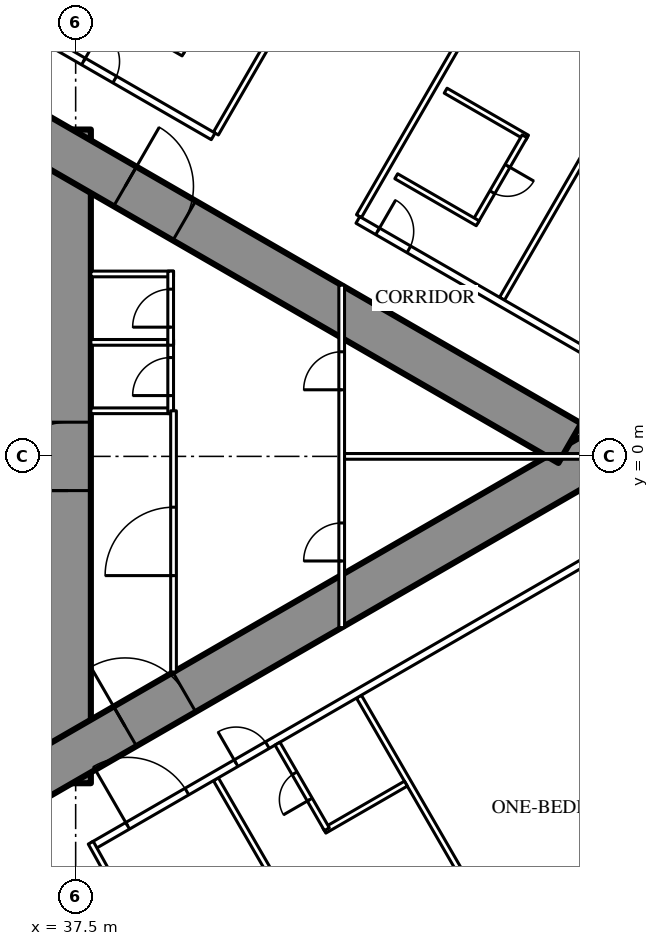
"""IFC4 building model, lengths in metres.
Left out: names, types, materials, properties, quantities, classifications, styles, units other than length and angle.
Written with IfcOpenShell. Run it as: python <this file> out.ifc"""

import sys

from ifc_helpers import new_model, si_unit, direction, frame, frame_2d, origin, place, context, subcontext, project, spatial, rectangle, extrude, element, fill, save


model = new_model("IFC4")
c1 = context("Model", 3, precision=1e-05, world=origin(), true_north=direction((0.0, 1.0)))
c2 = subcontext(c1, "Body", "Model", "MODEL_VIEW")
j1 = project(units=[si_unit("LENGTHUNIT", "METRE"), si_unit("PLANEANGLEUNIT", "RADIAN")], contexts=[c1])
p1 = place(None, origin())
s1 = spatial("IfcSite", under=j1, at=p1, CompositionType="ELEMENT")
p2 = place(p1, origin())
s2 = spatial("IfcBuilding", under=s1, at=p2, CompositionType="ELEMENT")
p3 = place(p2, frame((0.0, 0.0, 115.1)))
s3 = spatial("IfcBuildingStorey", under=s2, at=p3, CompositionType="ELEMENT", Elevation=115.1)
p4 = place(p3, frame((37.3, -8.6, 0.0), z_axis=(0.0, 0.0, 1.0), x_axis=(0.0, 1.0, 0.0)))
e1 = element("IfcWall", 1, at=p4, inside=s3, PredefinedType="SHEAR", context=c2, shape_type="SweptSolid", body=[
    extrude(rectangle(XDim=17.2, YDim=1.2, at=frame_2d((8.6, 0.0))), origin(), (0.0, 0.0, 1.0), 3.5),
])
p5 = place(p4, frame((7.7, 0.0, 0.0)))
e2 = element("IfcOpeningElement", 2, at=p5, cuts=e1, PredefinedType="OPENING", context=c2, shape_type="SweptSolid", body=[
    extrude(rectangle(XDim=1.8, YDim=2.2, at=frame_2d((0.9, 1.1))), frame((0.0, 0.61, 0.0), z_axis=(0.0, -1.0, 0.0), x_axis=(1.0, 0.0, 0.0)), (0.0, 0.0, 1.0), 1.22),
])
p6 = place(p3, frame((27.2, -13.8, 0.0), z_axis=(0.0, 0.0, 1.0), x_axis=(0.866027159892, 0.499996958321, 0.0)))
e3 = element("IfcWall", 3, at=p6, inside=s3, PredefinedType="SHEAR", context=c2, shape_type="SweptSolid", body=[
    extrude(rectangle(XDim=27.947, YDim=1.2, at=frame_2d((13.973, 0.0))), origin(), (0.0, 0.0, 1.0), 3.5),
])
p7 = place(p6, frame((4.6, 0.0, 0.0)))
e4 = element("IfcOpeningElement", 4, at=p7, cuts=e3, PredefinedType="OPENING", context=c2, shape_type="SweptSolid", body=[
    extrude(rectangle(XDim=1.0, YDim=2.2, at=frame_2d((0.5, 1.1))), frame((0.0, 0.61, 0.0), z_axis=(0.0, -1.0, 0.0), x_axis=(1.0, 0.0, 0.0)), (0.0, 0.0, 1.0), 1.22),
])
p8 = place(p6, frame((13.395, 0.0, 0.0)))
e5 = element("IfcOpeningElement", 5, at=p8, cuts=e3, PredefinedType="OPENING", context=c2, shape_type="SweptSolid", body=[
    extrude(rectangle(XDim=1.8, YDim=2.2, at=frame_2d((0.9, 1.1))), frame((0.0, 0.61, 0.0), z_axis=(0.0, -1.0, 0.0), x_axis=(1.0, 0.0, 0.0)), (0.0, 0.0, 1.0), 1.22),
])
p9 = place(p3, frame((27.2, 13.8, 0.0), z_axis=(0.0, 0.0, 1.0), x_axis=(0.866024515034, -0.500001539357, 0.0)))
e6 = element("IfcWall", 6, at=p9, inside=s3, PredefinedType="SHEAR", context=c2, shape_type="SweptSolid", body=[
    extrude(rectangle(XDim=26.907, YDim=1.2, at=frame_2d((13.454, 0.0))), origin(), (0.0, 0.0, 1.0), 3.5),
])
p10 = place(p9, frame((4.6, 0.0, 0.0)))
e7 = element("IfcOpeningElement", 7, at=p10, cuts=e6, PredefinedType="OPENING", context=c2, shape_type="SweptSolid", body=[
    extrude(rectangle(XDim=1.0, YDim=2.2, at=frame_2d((0.5, 1.1))), frame((0.0, 0.61, 0.0), z_axis=(0.0, -1.0, 0.0), x_axis=(1.0, 0.0, 0.0)), (0.0, 0.0, 1.0), 1.22),
])
p11 = place(p9, frame((13.395, 0.0, 0.0)))
e8 = element("IfcOpeningElement", 8, at=p11, cuts=e6, PredefinedType="OPENING", context=c2, shape_type="SweptSolid", body=[
    extrude(rectangle(XDim=1.8, YDim=2.2, at=frame_2d((0.9, 1.1))), frame((0.0, 0.61, 0.0), z_axis=(0.0, -1.0, 0.0), x_axis=(1.0, 0.0, 0.0)), (0.0, 0.0, 1.0), 1.22),
])
p12 = place(p3, frame((41.19, -8.494, 0.0), z_axis=(0.0, 0.0, 1.0), x_axis=(0.49999258054, -0.866029687369, 0.0)))
e9 = element("IfcWall", 9, at=p12, inside=s3, PredefinedType="PARTITIONING", context=c2, shape_type="SweptSolid", body=[
    extrude(rectangle(XDim=11.318, YDim=0.15, at=frame_2d((5.659, 0.0))), origin(), (0.0, 0.0, 1.0), 3.25),
])
p13 = place(p3, frame((44.954, -6.321, 0.0), z_axis=(0.0, 0.0, 1.0), x_axis=(0.500018676722, -0.866014620505, 0.0)))
e10 = element("IfcWall", 10, at=p13, inside=s3, PredefinedType="PARTITIONING", context=c2, shape_type="SweptSolid", body=[
    extrude(rectangle(XDim=8.704, YDim=0.15, at=frame_2d((4.352, 0.0))), origin(), (0.0, 0.0, 1.0), 2.2),
])
p14 = place(p3, frame((41.19, 8.494, 0.0), z_axis=(0.0, 0.0, 1.0), x_axis=(0.49999258054, 0.866029687369, 0.0)))
e11 = element("IfcWall", 11, at=p14, inside=s3, PredefinedType="PARTITIONING", context=c2, shape_type="SweptSolid", body=[
    extrude(rectangle(XDim=11.318, YDim=0.15, at=frame_2d((5.659, 0.0))), origin(), (0.0, 0.0, 1.0), 3.25),
])
p15 = place(p3, frame((44.954, 6.321, 0.0), z_axis=(0.0, 0.0, 1.0), x_axis=(0.500009815811, 0.866019736549, 0.0)))
e12 = element("IfcWall", 12, at=p15, inside=s3, PredefinedType="PARTITIONING", context=c2, shape_type="SweptSolid", body=[
    extrude(rectangle(XDim=11.424, YDim=0.15, at=frame_2d((5.712, 0.0))), origin(), (0.0, 0.0, 1.0), 3.25),
])
p16 = place(p3, frame((48.719, 4.147, 0.0), z_axis=(0.0, 0.0, 1.0), x_axis=(0.499993328235, 0.866029255696, 0.0)))
e13 = element("IfcWall", 13, at=p16, inside=s3, PredefinedType="PARTITIONING", context=c2, shape_type="SweptSolid", body=[
    extrude(rectangle(XDim=8.686, YDim=0.15, at=frame_2d((4.343, 0.0))), origin(), (0.0, 0.0, 1.0), 2.2),
])
p17 = place(p3, frame((37.96, -10.243, 0.0), z_axis=(0.0, 0.0, 1.0), x_axis=(0.866026429433, 0.499998223521, 0.0)))
e14 = element("IfcWall", 14, at=p17, inside=s3, PredefinedType="PARTITIONING", context=c2, shape_type="SweptSolid", body=[
    extrude(rectangle(XDim=20.487, YDim=0.2, at=frame_2d((10.243, 0.0))), origin(), (0.0, 0.0, 1.0), 3.25),
])
p18 = place(p17, frame((4.343, 0.0, 0.0)))
e15 = element("IfcOpeningElement", 15, at=p18, cuts=e14, PredefinedType="OPENING", context=c2, shape_type="SweptSolid", body=[
    extrude(rectangle(XDim=0.95, YDim=2.2, at=frame_2d((0.475, 1.1))), frame((0.0, 0.11, 0.0), z_axis=(0.0, -1.0, 0.0), x_axis=(1.0, 0.0, 0.0)), (0.0, 0.0, 1.0), 0.22),
])
p19 = place(p17, frame((15.385, 0.0, 0.0)))
e16 = element("IfcOpeningElement", 16, at=p19, cuts=e14, PredefinedType="OPENING", context=c2, shape_type="SweptSolid", body=[
    extrude(rectangle(XDim=0.95, YDim=2.2, at=frame_2d((0.475, 1.1))), frame((0.0, 0.11, 0.0), z_axis=(0.0, -1.0, 0.0), x_axis=(1.0, 0.0, 0.0)), (0.0, 0.0, 1.0), 0.22),
])
p20 = place(p17, frame((17.085, 0.0, 0.0)))
e17 = element("IfcOpeningElement", 17, at=p20, cuts=e14, PredefinedType="OPENING", context=c2, shape_type="SweptSolid", body=[
    extrude(rectangle(XDim=0.95, YDim=2.2, at=frame_2d((0.475, 1.1))), frame((0.0, 0.11, 0.0), z_axis=(0.0, -1.0, 0.0), x_axis=(1.0, 0.0, 0.0)), (0.0, 0.0, 1.0), 0.22),
])
p21 = place(p17, frame((1.048, 0.0, 0.0)))
e18 = element("IfcOpeningElement", 18, at=p21, cuts=e14, PredefinedType="OPENING", context=c2, shape_type="SweptSolid", body=[
    extrude(rectangle(XDim=1.8, YDim=2.2, at=frame_2d((0.9, 1.1))), frame((0.0, 0.11, 0.0), z_axis=(0.0, -1.0, 0.0), x_axis=(1.0, 0.0, 0.0)), (0.0, 0.0, 1.0), 0.22),
])
p22 = place(p3, frame((38.773, -11.742, 0.0), z_axis=(0.0, 0.0, 1.0), x_axis=(-0.485528096672, 0.8742210632, 0.0)))
e19 = element("IfcWall", 19, at=p22, inside=s3, PredefinedType="PARTITIONING", context=c2, shape_type="SweptSolid", body=[
    extrude(rectangle(XDim=1.805, YDim=0.15, at=frame_2d((0.903, 0.0))), origin(), (0.0, 0.0, 1.0), 3.25),
])
p23 = place(p3, frame((36.834, 10.894, 0.0), z_axis=(0.0, 0.0, 1.0), x_axis=(0.866032723471, -0.499987321717, 0.0)))
e20 = element("IfcWall", 20, at=p23, inside=s3, PredefinedType="PARTITIONING", context=c2, shape_type="SweptSolid", body=[
    extrude(rectangle(XDim=4.947, YDim=0.2, at=frame_2d((2.474, 0.0))), origin(), (0.0, 0.0, 1.0), 3.25),
])
p24 = place(p23, frame((1.006, 0.0, 0.0)))
e21 = element("IfcOpeningElement", 21, at=p24, cuts=e20, PredefinedType="OPENING", context=c2, shape_type="SweptSolid", body=[
    extrude(rectangle(XDim=0.95, YDim=2.2, at=frame_2d((0.475, 1.1))), frame((0.0, 0.11, 0.0), z_axis=(0.0, -1.0, 0.0), x_axis=(1.0, 0.0, 0.0)), (0.0, 0.0, 1.0), 0.22),
])
p25 = place(p3, frame((44.925, 6.222, 0.0), z_axis=(0.0, 0.0, 1.0), x_axis=(0.866025590081, -0.499999677325, 0.0)))
e22 = element("IfcWall", 22, at=p25, inside=s3, PredefinedType="PARTITIONING", context=c2, shape_type="SweptSolid", body=[
    extrude(rectangle(XDim=12.324, YDim=0.2, at=frame_2d((6.162, 0.0))), origin(), (0.0, 0.0, 1.0), 3.25),
])
p26 = place(p25, frame((9.042, 0.0, 0.0)))
e23 = element("IfcOpeningElement", 23, at=p26, cuts=e22, PredefinedType="OPENING", context=c2, shape_type="SweptSolid", body=[
    extrude(rectangle(XDim=0.95, YDim=2.2, at=frame_2d((0.475, 1.1))), frame((0.0, 0.11, 0.0), z_axis=(0.0, -1.0, 0.0), x_axis=(1.0, 0.0, 0.0)), (0.0, 0.0, 1.0), 0.22),
])
p27 = place(p25, frame((7.342, 0.0, 0.0)))
e24 = element("IfcOpeningElement", 24, at=p27, cuts=e22, PredefinedType="OPENING", context=c2, shape_type="SweptSolid", body=[
    extrude(rectangle(XDim=0.95, YDim=2.2, at=frame_2d((0.475, 1.1))), frame((0.0, 0.11, 0.0), z_axis=(0.0, -1.0, 0.0), x_axis=(1.0, 0.0, 0.0)), (0.0, 0.0, 1.0), 0.22),
])
p28 = place(p25, frame((0.6, 0.0, 0.0)))
e25 = element("IfcOpeningElement", 25, at=p28, cuts=e22, PredefinedType="OPENING", context=c2, shape_type="SweptSolid", body=[
    extrude(rectangle(XDim=0.95, YDim=2.2, at=frame_2d((0.475, 1.1))), frame((0.0, 0.11, 0.0), z_axis=(0.0, -1.0, 0.0), x_axis=(1.0, 0.0, 0.0)), (0.0, 0.0, 1.0), 0.22),
])
p29 = place(p3, frame((44.045, -9.848, 0.0), z_axis=(0.0, 0.0, 1.0), x_axis=(0.866031185235, 0.4999899861, 0.0)))
e26 = element("IfcWall", 26, at=p29, inside=s3, PredefinedType="PARTITIONING", context=c2, shape_type="SweptSolid", body=[
    extrude(rectangle(XDim=2.475, YDim=0.15, at=frame_2d((1.238, 0.0))), origin(), (0.0, 0.0, 1.0), 3.25),
])
p30 = place(p3, frame((42.81, -7.559, 0.0), z_axis=(0.0, 0.0, 1.0), x_axis=(0.499936506574, -0.866062058628, 0.0)))
e27 = element("IfcWall", 27, at=p30, inside=s3, PredefinedType="PARTITIONING", context=c2, shape_type="SweptSolid", body=[
    extrude(rectangle(XDim=2.6, YDim=0.15, at=frame_2d((1.3, 0.0))), origin(), (0.0, 0.0, 1.0), 3.25),
])
p31 = place(p30, frame((0.9, 0.0, 0.0)))
e28 = element("IfcOpeningElement", 28, at=p31, cuts=e27, PredefinedType="OPENING", context=c2, shape_type="SweptSolid", body=[
    extrude(rectangle(XDim=0.8, YDim=2.2, at=frame_2d((0.4, 1.1))), frame((0.0, 0.085, 0.0), z_axis=(0.0, -1.0, 0.0), x_axis=(1.0, 0.0, 0.0)), (0.0, 0.0, 1.0), 0.17),
])
p32 = place(p3, frame((47.235, 9.623, 0.0), z_axis=(0.0, 0.0, 1.0), x_axis=(0.866006523861, -0.500032699561, 0.0)))
e29 = element("IfcWall", 29, at=p32, inside=s3, PredefinedType="PARTITIONING", context=c2, shape_type="SweptSolid", body=[
    extrude(rectangle(XDim=2.475, YDim=0.15, at=frame_2d((1.237, 0.0))), origin(), (0.0, 0.0, 1.0), 3.25),
])
p33 = place(p3, frame((48.013, 6.171, 0.0), z_axis=(0.0, 0.0, 1.0), x_axis=(0.500006934395, 0.866021400173, 0.0)))
e30 = element("IfcWall", 30, at=p33, inside=s3, PredefinedType="PARTITIONING", context=c2, shape_type="SweptSolid", body=[
    extrude(rectangle(XDim=2.6, YDim=0.15, at=frame_2d((1.3, 0.0))), origin(), (0.0, 0.0, 1.0), 3.25),
])
p34 = place(p33, frame((0.9, 0.0, 0.0)))
e31 = element("IfcOpeningElement", 31, at=p34, cuts=e30, PredefinedType="OPENING", context=c2, shape_type="SweptSolid", body=[
    extrude(rectangle(XDim=0.8, YDim=2.2, at=frame_2d((0.4, 1.1))), frame((0.0, 0.085, 0.0), z_axis=(0.0, -1.0, 0.0), x_axis=(1.0, 0.0, 0.0)), (0.0, 0.0, 1.0), 0.17),
])
p35 = place(p3, frame((45.935, 7.371, 0.0), z_axis=(0.0, 0.0, 1.0), x_axis=(0.866031185235, -0.4999899861, 0.0)))
e32 = element("IfcWall", 32, at=p35, inside=s3, PredefinedType="PARTITIONING", context=c2, shape_type="SweptSolid", body=[
    extrude(rectangle(XDim=2.475, YDim=0.15, at=frame_2d((1.238, 0.0))), origin(), (0.0, 0.0, 1.0), 3.25),
])
p36 = place(p3, frame((40.274, 10.64, 0.0), z_axis=(0.0, 0.0, 1.0), x_axis=(0.49997716683, 0.86603858612, 0.0)))
e33 = element("IfcWall", 33, at=p36, inside=s3, PredefinedType="PARTITIONING", context=c2, shape_type="SweptSolid", body=[
    extrude(rectangle(XDim=2.6, YDim=0.15, at=frame_2d((1.3, 0.0))), origin(), (0.0, 0.0, 1.0), 3.25),
])
p37 = place(p36, frame((0.9, 0.0, 0.0)))
e34 = element("IfcOpeningElement", 34, at=p37, cuts=e33, PredefinedType="OPENING", context=c2, shape_type="SweptSolid", body=[
    extrude(rectangle(XDim=0.8, YDim=2.2, at=frame_2d((0.4, 1.1))), frame((0.0, 0.085, 0.0), z_axis=(0.0, -1.0, 0.0), x_axis=(1.0, 0.0, 0.0)), (0.0, 0.0, 1.0), 0.17),
])
p38 = place(p3, frame((38.195, 11.84, 0.0), z_axis=(0.0, 0.0, 1.0), x_axis=(0.866031185235, -0.4999899861, 0.0)))
e35 = element("IfcWall", 35, at=p38, inside=s3, PredefinedType="PARTITIONING", context=c2, shape_type="SweptSolid", body=[
    extrude(rectangle(XDim=2.475, YDim=0.15, at=frame_2d((1.238, 0.0))), origin(), (0.0, 0.0, 1.0), 3.25),
])
for number, where, z_axis, x_axis in (
    (36, (37.9, 1.2, 0.0), (0.0, 0.0, 1.0), (1.0, 0.0, 0.0)),
    (37, (37.9, 3.0, 0.0), (0.0, 0.0, 1.0), (1.0, 0.0, 0.0)),
    (38, (37.9, 4.8, 0.0), (0.0, 0.0, 1.0), (1.0, 0.0, 0.0)),
):
    element("IfcWall", number, at=place(p3, frame(where, z_axis=z_axis, x_axis=x_axis)), inside=s3, PredefinedType="PARTITIONING", context=c2, shape_type="SweptSolid", body=[
        extrude(rectangle(XDim=2.175, YDim=0.15, at=frame_2d((1.087, 0.0))), origin(), (0.0, 0.0, 1.0), 3.25),
    ])
p39 = place(p3, frame((40.0, 1.125, 0.0), z_axis=(0.0, 0.0, 1.0), x_axis=(0.0, 1.0, 0.0)))
e39 = element("IfcWall", 39, at=p39, inside=s3, PredefinedType="PARTITIONING", context=c2, shape_type="SweptSolid", body=[
    extrude(rectangle(XDim=1.95, YDim=0.15, at=frame_2d((0.975, 0.0))), origin(), (0.0, 0.0, 1.0), 3.25),
])
p40 = place(p39, frame((0.475, 0.0, 0.0)))
e40 = element("IfcOpeningElement", 40, at=p40, cuts=e39, PredefinedType="OPENING", context=c2, shape_type="SweptSolid", body=[
    extrude(rectangle(XDim=1.0, YDim=2.2, at=frame_2d((0.5, 1.1))), frame((0.0, 0.085, 0.0), z_axis=(0.0, -1.0, 0.0), x_axis=(1.0, 0.0, 0.0)), (0.0, 0.0, 1.0), 0.17),
])
p41 = place(p3, frame((40.0, 2.925, 0.0), z_axis=(0.0, 0.0, 1.0), x_axis=(0.0, 1.0, 0.0)))
e41 = element("IfcWall", 41, at=p41, inside=s3, PredefinedType="PARTITIONING", context=c2, shape_type="SweptSolid", body=[
    extrude(rectangle(XDim=1.95, YDim=0.15, at=frame_2d((0.975, 0.0))), origin(), (0.0, 0.0, 1.0), 3.25),
])
p42 = place(p41, frame((0.475, 0.0, 0.0)))
e42 = element("IfcOpeningElement", 42, at=p42, cuts=e41, PredefinedType="OPENING", context=c2, shape_type="SweptSolid", body=[
    extrude(rectangle(XDim=1.0, YDim=2.2, at=frame_2d((0.5, 1.1))), frame((0.0, 0.085, 0.0), z_axis=(0.0, -1.0, 0.0), x_axis=(1.0, 0.0, 0.0)), (0.0, 0.0, 1.0), 0.17),
])
p43 = place(p3, frame((40.075, -5.674, 0.0), z_axis=(0.0, 0.0, 1.0), x_axis=(0.0, 1.0, 0.0)))
e43 = element("IfcWall", 43, at=p43, inside=s3, PredefinedType="PARTITIONING", context=c2, shape_type="SweptSolid", body=[
    extrude(rectangle(XDim=6.874, YDim=0.15, at=frame_2d((3.437, 0.0))), origin(), (0.0, 0.0, 1.0), 3.25),
])
p44 = place(p43, frame((2.537, 0.0, 0.0)))
e44 = element("IfcOpeningElement", 44, at=p44, cuts=e43, PredefinedType="OPENING", context=c2, shape_type="SweptSolid", body=[
    extrude(rectangle(XDim=1.8, YDim=2.2, at=frame_2d((0.9, 1.1))), frame((0.0, 0.085, 0.0), z_axis=(0.0, -1.0, 0.0), x_axis=(1.0, 0.0, 0.0)), (0.0, 0.0, 1.0), 0.17),
])
p45 = place(p3, frame((44.5, -4.505, 0.0), z_axis=(0.0, 0.0, 1.0), x_axis=(0.0, 1.0, 0.0)))
e45 = element("IfcWall", 45, at=p45, inside=s3, PredefinedType="PARTITIONING", context=c2, shape_type="SweptSolid", body=[
    extrude(rectangle(XDim=9.009, YDim=0.15, at=frame_2d((4.505, 0.0))), origin(), (0.0, 0.0, 1.0), 2.45),
])
p46 = place(p45, frame((1.752, 0.0, 0.0)))
e46 = element("IfcOpeningElement", 46, at=p46, cuts=e45, PredefinedType="OPENING", context=c2, shape_type="SweptSolid", body=[
    extrude(rectangle(XDim=1.0, YDim=2.2, at=frame_2d((0.5, 1.1))), frame((0.0, 0.085, 0.0), z_axis=(0.0, -1.0, 0.0), x_axis=(1.0, 0.0, 0.0)), (0.0, 0.0, 1.0), 0.17),
])
p47 = place(p45, frame((6.257, 0.0, 0.0)))
e47 = element("IfcOpeningElement", 47, at=p47, cuts=e45, PredefinedType="OPENING", context=c2, shape_type="SweptSolid", body=[
    extrude(rectangle(XDim=1.0, YDim=2.2, at=frame_2d((0.5, 1.1))), frame((0.0, 0.085, 0.0), z_axis=(0.0, -1.0, 0.0), x_axis=(1.0, 0.0, 0.0)), (0.0, 0.0, 1.0), 0.17),
])
p48 = place(p3, frame((44.575, 0.0, 0.0), z_axis=(0.0, 0.0, 1.0), x_axis=(1.0, 0.0, 0.0)))
e48 = element("IfcWall", 48, at=p48, inside=s3, PredefinedType="PARTITIONING", context=c2, shape_type="SweptSolid", body=[
    extrude(rectangle(XDim=7.727, YDim=0.15, at=frame_2d((3.864, 0.0))), origin(), (0.0, 0.0, 1.0), 2.2),
])
p49 = place(p31, origin())
e49 = element("IfcDoor", 49, at=p49, inside=s3, OperationType="SINGLE_SWING_RIGHT", PredefinedType="DOOR", context=c2, shape_type="SweptSolid", body=[
    extrude(rectangle(XDim=0.8, YDim=2.2, at=frame_2d((0.4, 1.1))), frame((0.0, 0.025, 0.0), z_axis=(0.0, -1.0, 0.0), x_axis=(1.0, 0.0, 0.0)), (0.0, 0.0, 1.0), 0.05),
])
fill(e28, e49)
p50 = place(p18, origin())
e50 = element("IfcDoor", 50, at=p50, inside=s3, OperationType="SINGLE_SWING_LEFT", PredefinedType="DOOR", context=c2, shape_type="SweptSolid", body=[
    extrude(rectangle(XDim=0.95, YDim=2.2, at=frame_2d((0.475, 1.1))), frame((0.0, 0.025, 0.0), z_axis=(0.0, -1.0, 0.0), x_axis=(1.0, 0.0, 0.0)), (0.0, 0.0, 1.0), 0.05),
])
fill(e15, e50)
p51 = place(p34, origin())
e51 = element("IfcDoor", 51, at=p51, inside=s3, OperationType="SINGLE_SWING_RIGHT", PredefinedType="DOOR", context=c2, shape_type="SweptSolid", body=[
    extrude(rectangle(XDim=0.8, YDim=2.2, at=frame_2d((0.4, 1.1))), frame((0.0, 0.025, 0.0), z_axis=(0.0, -1.0, 0.0), x_axis=(1.0, 0.0, 0.0)), (0.0, 0.0, 1.0), 0.05),
])
fill(e31, e51)
p52 = place(p28, origin())
e52 = element("IfcDoor", 52, at=p52, inside=s3, OperationType="SINGLE_SWING_LEFT", PredefinedType="DOOR", context=c2, shape_type="SweptSolid", body=[
    extrude(rectangle(XDim=0.95, YDim=2.2, at=frame_2d((0.475, 1.1))), frame((0.0, 0.025, 0.0), z_axis=(0.0, -1.0, 0.0), x_axis=(1.0, 0.0, 0.0)), (0.0, 0.0, 1.0), 0.05),
])
fill(e25, e52)
p53 = place(p24, origin())
e53 = element("IfcDoor", 53, at=p53, inside=s3, OperationType="SINGLE_SWING_LEFT", PredefinedType="DOOR", context=c2, shape_type="SweptSolid", body=[
    extrude(rectangle(XDim=0.95, YDim=2.2, at=frame_2d((0.475, 1.1))), frame((0.0, 0.025, 0.0), z_axis=(0.0, -1.0, 0.0), x_axis=(1.0, 0.0, 0.0)), (0.0, 0.0, 1.0), 0.05),
])
fill(e21, e53)
p54 = place(p21, origin())
e54 = element("IfcDoor", 54, at=p54, inside=s3, OperationType="DOUBLE_DOOR_SINGLE_SWING", PredefinedType="DOOR", context=c2, shape_type="SweptSolid", body=[
    extrude(rectangle(XDim=1.8, YDim=2.2, at=frame_2d((0.9, 1.1))), frame((0.0, 0.025, 0.0), z_axis=(0.0, -1.0, 0.0), x_axis=(1.0, 0.0, 0.0)), (0.0, 0.0, 1.0), 0.05),
])
fill(e18, e54)
p55 = place(p40, origin())
e55 = element("IfcDoor", 55, at=p55, inside=s3, OperationType="SINGLE_SWING_LEFT", PredefinedType="DOOR", context=c2, shape_type="SweptSolid", body=[
    extrude(rectangle(XDim=1.0, YDim=2.2, at=frame_2d((0.5, 1.1))), frame((0.0, 0.025, 0.0), z_axis=(0.0, -1.0, 0.0), x_axis=(1.0, 0.0, 0.0)), (0.0, 0.0, 1.0), 0.05),
])
fill(e40, e55)
p56 = place(p42, origin())
e56 = element("IfcDoor", 56, at=p56, inside=s3, OperationType="SINGLE_SWING_LEFT", PredefinedType="DOOR", context=c2, shape_type="SweptSolid", body=[
    extrude(rectangle(XDim=1.0, YDim=2.2, at=frame_2d((0.5, 1.1))), frame((0.0, 0.025, 0.0), z_axis=(0.0, -1.0, 0.0), x_axis=(1.0, 0.0, 0.0)), (0.0, 0.0, 1.0), 0.05),
])
fill(e42, e56)
p57 = place(p44, origin())
e57 = element("IfcDoor", 57, at=p57, inside=s3, OperationType="DOUBLE_DOOR_SINGLE_SWING", PredefinedType="DOOR", context=c2, shape_type="SweptSolid", body=[
    extrude(rectangle(XDim=1.8, YDim=2.2, at=frame_2d((0.9, 1.1))), frame((0.0, 0.025, 0.0), z_axis=(0.0, -1.0, 0.0), x_axis=(1.0, 0.0, 0.0)), (0.0, 0.0, 1.0), 0.05),
])
fill(e44, e57)
p58 = place(p46, origin())
e58 = element("IfcDoor", 58, at=p58, inside=s3, OperationType="SINGLE_SWING_LEFT", PredefinedType="DOOR", context=c2, shape_type="SweptSolid", body=[
    extrude(rectangle(XDim=1.0, YDim=2.2, at=frame_2d((0.5, 1.1))), frame((0.0, 0.025, 0.0), z_axis=(0.0, -1.0, 0.0), x_axis=(1.0, 0.0, 0.0)), (0.0, 0.0, 1.0), 0.05),
])
fill(e46, e58)
p59 = place(p47, origin())
e59 = element("IfcDoor", 59, at=p59, inside=s3, OperationType="SINGLE_SWING_LEFT", PredefinedType="DOOR", context=c2, shape_type="SweptSolid", body=[
    extrude(rectangle(XDim=1.0, YDim=2.2, at=frame_2d((0.5, 1.1))), frame((0.0, 0.025, 0.0), z_axis=(0.0, -1.0, 0.0), x_axis=(1.0, 0.0, 0.0)), (0.0, 0.0, 1.0), 0.05),
])
fill(e47, e59)
p60 = place(p8, origin())
e60 = element("IfcDoor", 60, at=p60, inside=s3, OperationType="DOUBLE_DOOR_SINGLE_SWING", PredefinedType="DOOR", context=c2, shape_type="SweptSolid", body=[
    extrude(rectangle(XDim=1.8, YDim=2.2, at=frame_2d((0.9, 1.1))), frame((0.0, 0.025, 0.0), z_axis=(0.0, -1.0, 0.0), x_axis=(1.0, 0.0, 0.0)), (0.0, 0.0, 1.0), 0.05),
])
fill(e5, e60)
p61 = place(p11, origin())
e61 = element("IfcDoor", 61, at=p61, inside=s3, OperationType="DOUBLE_DOOR_SINGLE_SWING", PredefinedType="DOOR", context=c2, shape_type="SweptSolid", body=[
    extrude(rectangle(XDim=1.8, YDim=2.2, at=frame_2d((0.9, 1.1))), frame((0.0, 0.025, 0.0), z_axis=(0.0, -1.0, 0.0), x_axis=(1.0, 0.0, 0.0)), (0.0, 0.0, 1.0), 0.05),
])
fill(e8, e61)
p62 = place(p5, origin())
e62 = element("IfcDoor", 62, at=p62, inside=s3, OperationType="DOUBLE_DOOR_SINGLE_SWING", PredefinedType="DOOR", context=c2, shape_type="SweptSolid", body=[
    extrude(rectangle(XDim=1.8, YDim=2.2, at=frame_2d((0.9, 1.1))), frame((0.0, 0.025, 0.0), z_axis=(0.0, -1.0, 0.0), x_axis=(1.0, 0.0, 0.0)), (0.0, 0.0, 1.0), 0.05),
])
fill(e2, e62)
save(model, sys.argv[1])
